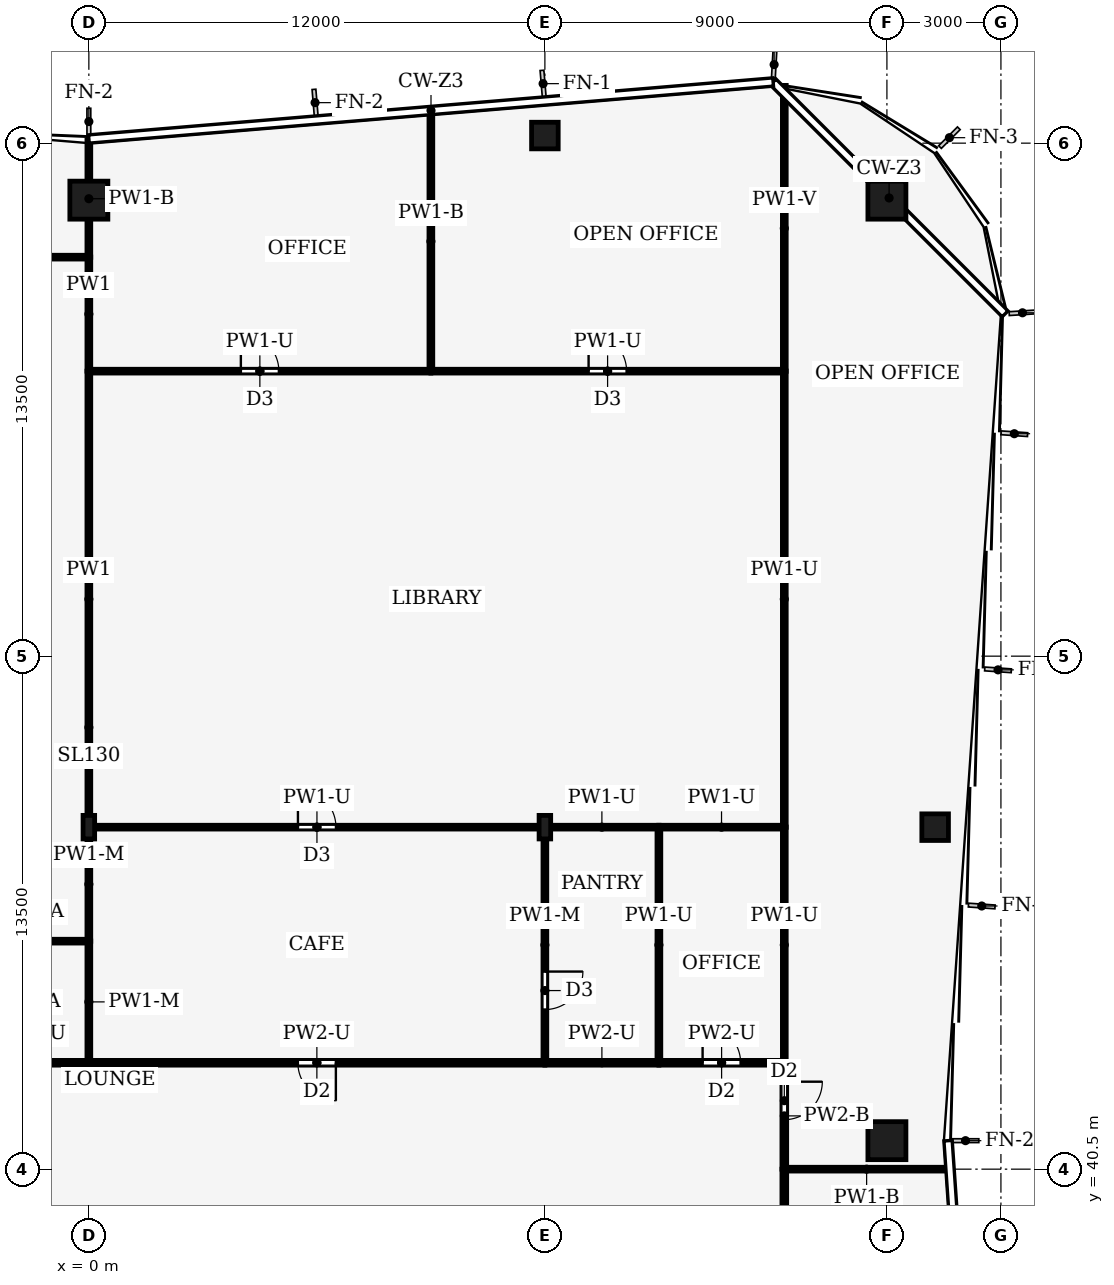
"""IFC4 building model, lengths in metres.
Left out: names, types, materials, properties, quantities, classifications, styles, units other than length and angle.
Written with IfcOpenShell. Run it as: python <this file> out.ifc"""

import sys

from ifc_helpers import new_model, si_unit, direction, frame, frame_2d, origin, origin_2d, place, context, subcontext, project, spatial, rectangle, hollow_rectangle, i_section, extrude, element, fill, save


model = new_model("IFC4")
c1 = context("Model", 3, precision=1e-05, world=origin(), true_north=direction((0.0, 1.0)))
c2 = subcontext(c1, "Body", "Model", "MODEL_VIEW")
j1 = project(units=[si_unit("LENGTHUNIT", "METRE"), si_unit("PLANEANGLEUNIT", "RADIAN")], contexts=[c1])
p1 = place(None, origin())
s1 = spatial("IfcSite", under=j1, at=p1, CompositionType="ELEMENT")
p2 = place(p1, origin())
s2 = spatial("IfcBuilding", under=s1, at=p2, CompositionType="ELEMENT")
p3 = place(p2, frame((0.0, 0.0, 177.0)))
s3 = spatial("IfcBuildingStorey", under=s2, at=p3, CompositionType="ELEMENT", Elevation=177.0)
for number, where, z_axis, x_axis in (
    (1, (0.0, 66.0, 0.0), (0.0, 0.0, 1.0), (1.0, 0.0, 0.0)),
    (2, (21.0, 66.0, 0.0), (0.0, 0.0, 1.0), (1.0, 0.0, 0.0)),
    (3, (21.0, 41.25, 0.0), (0.0, 0.0, 1.0), (1.0, 0.0, 0.0)),
):
    element("IfcColumn", number, at=place(p3, frame(where, z_axis=z_axis, x_axis=x_axis)), inside=s3, PredefinedType="COLUMN", context=c2, shape_type="SweptSolid", body=[
        extrude(hollow_rectangle(XDim=1.0, YDim=1.0, WallThickness=0.06, at=origin_2d()), origin(), (0.0, 0.0, 1.0), 5.0),
    ])
for number, where, z_axis, x_axis in (
    (4, (12.0, 67.7, 0.0), (0.0, 0.0, 1.0), (1.0, 0.0, 0.0)),
    (5, (22.269, 49.5, 0.0), (0.0, 0.0, 1.0), (1.0, 0.0, 0.0)),
):
    element("IfcColumn", number, at=place(p3, frame(where, z_axis=z_axis, x_axis=x_axis)), inside=s3, PredefinedType="COLUMN", context=c2, shape_type="SweptSolid", body=[
        extrude(hollow_rectangle(XDim=0.7, YDim=0.7, WallThickness=0.03, at=origin_2d()), origin(), (0.0, 0.0, 1.0), 5.0),
    ])
for number, where, z_axis, x_axis in (
    (6, (0.0, 49.5, 0.0), (0.0, 0.0, 1.0), (1.0, 0.0, 0.0)),
    (7, (12.0, 49.5, 0.0), (0.0, 0.0, 1.0), (1.0, 0.0, 0.0)),
):
    element("IfcColumn", number, at=place(p3, frame(where, z_axis=z_axis, x_axis=x_axis)), inside=s3, PredefinedType="COLUMN", context=c2, shape_type="SweptSolid", body=[
        extrude(i_section(OverallWidth=0.305, OverallDepth=0.62, WebThickness=0.021, FlangeThickness=0.04, FilletRadius=0.027, at=origin_2d()), origin(), (0.0, 0.0, 1.0), 5.0),
    ])
p4 = place(p3, frame((-3.0, 43.3, 0.0), z_axis=(0.0, 0.0, 1.0), x_axis=(1.0, 0.0, 0.0)))
e8 = element("IfcWall", 8, at=p4, inside=s3, PredefinedType="PARTITIONING", context=c2, shape_type="SweptSolid", body=[
    extrude(rectangle(XDim=3.0, YDim=0.125, at=frame_2d((1.5, 0.0))), origin(), (0.0, 0.0, 1.0), 4.44),
])
p5 = place(p4, frame((1.0, 0.0, 0.0)))
e9 = element("IfcOpeningElement", 9, at=p5, cuts=e8, PredefinedType="OPENING", context=c2, shape_type="SweptSolid", body=[
    extrude(rectangle(XDim=1.0, YDim=2.1, at=frame_2d((0.5, 1.05))), frame((0.0, 0.073, 0.0), z_axis=(0.0, -1.0, 0.0), x_axis=(1.0, 0.0, 0.0)), (0.0, 0.0, 1.0), 0.145),
])
p6 = place(p3, frame((12.0, 43.3, 0.0), z_axis=(0.0, 0.0, 1.0), x_axis=(-1.0, 0.0, 0.0)))
e10 = element("IfcWall", 10, at=p6, inside=s3, PredefinedType="PARTITIONING", context=c2, shape_type="SweptSolid", body=[
    extrude(rectangle(XDim=12.0, YDim=0.125, at=frame_2d((6.0, 0.0))), origin(), (0.0, 0.0, 1.0), 4.44),
])
p7 = place(p6, frame((5.5, 0.0, 0.0)))
e11 = element("IfcOpeningElement", 11, at=p7, cuts=e10, PredefinedType="OPENING", context=c2, shape_type="SweptSolid", body=[
    extrude(rectangle(XDim=1.0, YDim=2.1, at=frame_2d((0.5, 1.05))), frame((0.0, 0.073, 0.0), z_axis=(0.0, -1.0, 0.0), x_axis=(1.0, 0.0, 0.0)), (0.0, 0.0, 1.0), 0.145),
])
p8 = place(p3, frame((15.0, 43.3, 0.0), z_axis=(0.0, 0.0, 1.0), x_axis=(-1.0, 0.0, 0.0)))
e12 = element("IfcWall", 12, at=p8, inside=s3, PredefinedType="PARTITIONING", context=c2, shape_type="SweptSolid", body=[
    extrude(rectangle(XDim=3.0, YDim=0.125, at=frame_2d((1.5, 0.0))), origin(), (0.0, 0.0, 1.0), 4.44),
])
p9 = place(p3, frame((15.0, 43.3, 0.0), z_axis=(0.0, 0.0, 1.0), x_axis=(1.0, 0.0, 0.0)))
e13 = element("IfcWall", 13, at=p9, inside=s3, PredefinedType="PARTITIONING", context=c2, shape_type="SweptSolid", body=[
    extrude(rectangle(XDim=3.3, YDim=0.125, at=frame_2d((1.65, 0.0))), origin(), (0.0, 0.0, 1.0), 4.44),
])
p10 = place(p9, frame((1.15, 0.0, 0.0)))
e14 = element("IfcOpeningElement", 14, at=p10, cuts=e13, PredefinedType="OPENING", context=c2, shape_type="SweptSolid", body=[
    extrude(rectangle(XDim=1.0, YDim=2.1, at=frame_2d((0.5, 1.05))), frame((0.0, 0.073, 0.0), z_axis=(0.0, -1.0, 0.0), x_axis=(1.0, 0.0, 0.0)), (0.0, 0.0, 1.0), 0.145),
])
p11 = place(p3, frame((18.3, 40.5, 0.0), z_axis=(0.0, 0.0, 1.0), x_axis=(0.0, -1.0, 0.0)))
e15 = element("IfcWall", 15, at=p11, inside=s3, PredefinedType="PARTITIONING", context=c2, shape_type="SweptSolid", body=[
    extrude(rectangle(XDim=12.0, YDim=0.125, at=frame_2d((6.0, 0.0))), origin(), (0.0, 0.0, 1.0), 4.14),
])
p12 = place(p11, frame((5.5, 0.0, 0.0)))
e16 = element("IfcOpeningElement", 16, at=p12, cuts=e15, PredefinedType="OPENING", context=c2, shape_type="SweptSolid", body=[
    extrude(rectangle(XDim=1.0, YDim=2.1, at=frame_2d((0.5, 1.05))), frame((0.0, 0.073, 0.0), z_axis=(0.0, -1.0, 0.0), x_axis=(1.0, 0.0, 0.0)), (0.0, 0.0, 1.0), 0.145),
])
p13 = place(p3, frame((18.3, 43.304, 0.0), z_axis=(0.0, 0.0, 1.0), x_axis=(0.0, -1.0, 0.0)))
e17 = element("IfcWall", 17, at=p13, inside=s3, PredefinedType="PARTITIONING", context=c2, shape_type="SweptSolid", body=[
    extrude(rectangle(XDim=2.804, YDim=0.125, at=frame_2d((1.402, 0.0))), origin(), (0.0, 0.0, 1.0), 4.87),
])
p14 = place(p13, frame((0.502, 0.0, 0.0)))
e18 = element("IfcOpeningElement", 18, at=p14, cuts=e17, PredefinedType="OPENING", context=c2, shape_type="SweptSolid", body=[
    extrude(rectangle(XDim=1.0, YDim=2.1, at=frame_2d((0.5, 1.05))), frame((0.0, 0.073, 0.0), z_axis=(0.0, -1.0, 0.0), x_axis=(1.0, 0.0, 0.0)), (0.0, 0.0, 1.0), 0.145),
])
p15 = place(p3, frame((-3.004, 46.5, 0.0), z_axis=(0.0, 0.0, 1.0), x_axis=(1.0, 0.0, 0.0)))
e19 = element("IfcWall", 19, at=p15, inside=s3, PredefinedType="PARTITIONING", context=c2, shape_type="SweptSolid", body=[
    extrude(rectangle(XDim=3.004, YDim=0.1, at=frame_2d((1.502, 0.0))), origin(), (0.0, 0.0, 1.0), 4.87),
])
p16 = place(p15, frame((0.602, 0.0, 0.0)))
e20 = element("IfcOpeningElement", 20, at=p16, cuts=e19, PredefinedType="OPENING", context=c2, shape_type="SweptSolid", body=[
    extrude(rectangle(XDim=1.0, YDim=2.1, at=frame_2d((0.5, 1.05))), frame((0.0, 0.06, 0.0), z_axis=(0.0, -1.0, 0.0), x_axis=(1.0, 0.0, 0.0)), (0.0, 0.0, 1.0), 0.12),
])
p17 = place(p3, frame((0.0, 43.3, 0.0), z_axis=(0.0, 0.0, 1.0), x_axis=(0.0, 1.0, 0.0)))
e21 = element("IfcWall", 21, at=p17, inside=s3, PredefinedType="PARTITIONING", context=c2, shape_type="SweptSolid", body=[
    extrude(rectangle(XDim=3.204, YDim=0.1, at=frame_2d((1.602, 0.0))), origin(), (0.0, 0.0, 1.0), 4.44),
])
p18 = place(p3, frame((-9.0, 64.5, 0.0), z_axis=(0.0, 0.0, 1.0), x_axis=(1.0, 0.0, 0.0)))
e22 = element("IfcWall", 22, at=p18, inside=s3, PredefinedType="PARTITIONING", context=c2, shape_type="SweptSolid", body=[
    extrude(rectangle(XDim=9.0, YDim=0.1, at=frame_2d((4.5, 0.0))), origin(), (0.0, 0.0, 1.0), 4.24),
])
p19 = place(p18, frame((4.0, 0.0, 0.0)))
e23 = element("IfcOpeningElement", 23, at=p19, cuts=e22, PredefinedType="OPENING", context=c2, shape_type="SweptSolid", body=[
    extrude(rectangle(XDim=1.0, YDim=2.1, at=frame_2d((0.5, 1.05))), frame((0.0, 0.06, 0.0), z_axis=(0.0, -1.0, 0.0), x_axis=(1.0, 0.0, 0.0)), (0.0, 0.0, 1.0), 0.12),
])
p20 = place(p3, frame((0.0, 46.496, 0.0), z_axis=(0.0, 0.0, 1.0), x_axis=(0.0, 1.0, 0.0)))
e24 = element("IfcWall", 24, at=p20, inside=s3, PredefinedType="PARTITIONING", context=c2, shape_type="SweptSolid", body=[
    extrude(rectangle(XDim=3.004, YDim=0.1, at=frame_2d((1.502, 0.0))), origin(), (0.0, 0.0, 1.0), 4.44),
])
p21 = place(p3, frame((0.0, 49.5, 0.0), z_axis=(0.0, 0.0, 1.0), x_axis=(0.0, 1.0, 0.0)))
e25 = element("IfcWall", 25, at=p21, inside=s3, PredefinedType="PARTITIONING", context=c2, shape_type="SweptSolid", body=[
    extrude(rectangle(XDim=12.0, YDim=0.1, at=frame_2d((6.0, 0.0))), origin(), (0.0, 0.0, 1.0), 4.29),
])
p22 = place(p3, frame((0.0, 61.5, 0.0), z_axis=(0.0, 0.0, 1.0), x_axis=(0.0, 1.0, 0.0)))
e26 = element("IfcWall", 26, at=p22, inside=s3, PredefinedType="PARTITIONING", context=c2, shape_type="SweptSolid", body=[
    extrude(rectangle(XDim=3.004, YDim=0.1, at=frame_2d((1.502, 0.0))), origin(), (0.0, 0.0, 1.0), 4.29),
])
p23 = place(p3, frame((0.0, 64.496, 0.0), z_axis=(0.0, 0.0, 1.0), x_axis=(0.0, 1.0, 0.0)))
e27 = element("IfcWall", 27, at=p23, inside=s3, PredefinedType="PARTITIONING", context=c2, shape_type="SweptSolid", body=[
    extrude(rectangle(XDim=3.084, YDim=0.1, at=frame_2d((1.542, 0.0))), origin(), (0.0, 0.0, 1.0), 4.04),
])
p24 = place(p3, frame((12.0, 49.5, 0.0), z_axis=(0.0, 0.0, 1.0), x_axis=(0.0, -1.0, 0.0)))
e28 = element("IfcWall", 28, at=p24, inside=s3, PredefinedType="PARTITIONING", context=c2, shape_type="SweptSolid", body=[
    extrude(rectangle(XDim=6.2, YDim=0.1, at=frame_2d((3.1, 0.0))), origin(), (0.0, 0.0, 1.0), 4.44),
])
p25 = place(p24, frame((3.8, 0.0, 0.0)))
e29 = element("IfcOpeningElement", 29, at=p25, cuts=e28, PredefinedType="OPENING", context=c2, shape_type="SweptSolid", body=[
    extrude(rectangle(XDim=1.0, YDim=2.1, at=frame_2d((0.5, 1.05))), frame((0.0, 0.06, 0.0), z_axis=(0.0, -1.0, 0.0), x_axis=(1.0, 0.0, 0.0)), (0.0, 0.0, 1.0), 0.12),
])
p26 = place(p3, frame((0.0, 49.5, 0.0), z_axis=(0.0, 0.0, 1.0), x_axis=(1.0, 0.0, 0.0)))
e30 = element("IfcWall", 30, at=p26, inside=s3, PredefinedType="PARTITIONING", context=c2, shape_type="SweptSolid", body=[
    extrude(rectangle(XDim=12.004, YDim=0.1, at=frame_2d((6.002, 0.0))), origin(), (0.0, 0.0, 1.0), 4.24),
])
p27 = place(p26, frame((5.502, 0.0, 0.0)))
e31 = element("IfcOpeningElement", 31, at=p27, cuts=e30, PredefinedType="OPENING", context=c2, shape_type="SweptSolid", body=[
    extrude(rectangle(XDim=1.0, YDim=2.1, at=frame_2d((0.5, 1.05))), frame((0.0, 0.06, 0.0), z_axis=(0.0, -1.0, 0.0), x_axis=(1.0, 0.0, 0.0)), (0.0, 0.0, 1.0), 0.12),
])
p28 = place(p3, frame((15.0, 43.3, 0.0), z_axis=(0.0, 0.0, 1.0), x_axis=(0.0, 1.0, 0.0)))
e32 = element("IfcWall", 32, at=p28, inside=s3, PredefinedType="PARTITIONING", context=c2, shape_type="SweptSolid", body=[
    extrude(rectangle(XDim=6.2, YDim=0.1, at=frame_2d((3.1, 0.0))), origin(), (0.0, 0.0, 1.0), 4.24),
])
p29 = place(p3, frame((15.004, 49.5, 0.0), z_axis=(0.0, 0.0, 1.0), x_axis=(-1.0, 0.0, 0.0)))
e33 = element("IfcWall", 33, at=p29, inside=s3, PredefinedType="PARTITIONING", context=c2, shape_type="SweptSolid", body=[
    extrude(rectangle(XDim=3.008, YDim=0.1, at=frame_2d((1.504, 0.0))), origin(), (0.0, 0.0, 1.0), 4.24),
])
p30 = place(p3, frame((18.3, 49.5, 0.0), z_axis=(0.0, 0.0, 1.0), x_axis=(-1.0, 0.0, 0.0)))
e34 = element("IfcWall", 34, at=p30, inside=s3, PredefinedType="PARTITIONING", context=c2, shape_type="SweptSolid", body=[
    extrude(rectangle(XDim=3.304, YDim=0.1, at=frame_2d((1.652, 0.0))), origin(), (0.0, 0.0, 1.0), 4.24),
])
p31 = place(p3, frame((18.3, 43.296, 0.0), z_axis=(0.0, 0.0, 1.0), x_axis=(0.0, 1.0, 0.0)))
e35 = element("IfcWall", 35, at=p31, inside=s3, PredefinedType="PARTITIONING", context=c2, shape_type="SweptSolid", body=[
    extrude(rectangle(XDim=6.208, YDim=0.1, at=frame_2d((3.104, 0.0))), origin(), (0.0, 0.0, 1.0), 4.24),
])
p32 = place(p3, frame((0.0, 61.5, 0.0), z_axis=(0.0, 0.0, 1.0), x_axis=(1.0, 0.0, 0.0)))
e36 = element("IfcWall", 36, at=p32, inside=s3, PredefinedType="PARTITIONING", context=c2, shape_type="SweptSolid", body=[
    extrude(rectangle(XDim=9.0, YDim=0.1, at=frame_2d((4.5, 0.0))), origin(), (0.0, 0.0, 1.0), 4.24),
])
p33 = place(p32, frame((4.0, 0.0, 0.0)))
e37 = element("IfcOpeningElement", 37, at=p33, cuts=e36, PredefinedType="OPENING", context=c2, shape_type="SweptSolid", body=[
    extrude(rectangle(XDim=1.0, YDim=2.1, at=frame_2d((0.5, 1.05))), frame((0.0, 0.06, 0.0), z_axis=(0.0, -1.0, 0.0), x_axis=(1.0, 0.0, 0.0)), (0.0, 0.0, 1.0), 0.12),
])
p34 = place(p3, frame((9.0, 61.5, 0.0), z_axis=(0.0, 0.0, 1.0), x_axis=(1.0, 0.0, 0.0)))
e38 = element("IfcWall", 38, at=p34, inside=s3, PredefinedType="PARTITIONING", context=c2, shape_type="SweptSolid", body=[
    extrude(rectangle(XDim=9.3, YDim=0.1, at=frame_2d((4.65, 0.0))), origin(), (0.0, 0.0, 1.0), 4.24),
])
p35 = place(p34, frame((4.15, 0.0, 0.0)))
e39 = element("IfcOpeningElement", 39, at=p35, cuts=e38, PredefinedType="OPENING", context=c2, shape_type="SweptSolid", body=[
    extrude(rectangle(XDim=1.0, YDim=2.1, at=frame_2d((0.5, 1.05))), frame((0.0, 0.06, 0.0), z_axis=(0.0, -1.0, 0.0), x_axis=(1.0, 0.0, 0.0)), (0.0, 0.0, 1.0), 0.12),
])
p36 = place(p3, frame((18.3, 49.496, 0.0), z_axis=(0.0, 0.0, 1.0), x_axis=(0.0, 1.0, 0.0)))
e40 = element("IfcWall", 40, at=p36, inside=s3, PredefinedType="PARTITIONING", context=c2, shape_type="SweptSolid", body=[
    extrude(rectangle(XDim=12.008, YDim=0.1, at=frame_2d((6.004, 0.0))), origin(), (0.0, 0.0, 1.0), 4.24),
])
p37 = place(p3, frame((9.0, 61.5, 0.0), z_axis=(0.0, 0.0, 1.0), x_axis=(0.0, 1.0, 0.0)))
e41 = element("IfcWall", 41, at=p37, inside=s3, PredefinedType="PARTITIONING", context=c2, shape_type="SweptSolid", body=[
    extrude(rectangle(XDim=6.83, YDim=0.1, at=frame_2d((3.415, 0.0))), origin(), (0.0, 0.0, 1.0), 4.04),
])
p38 = place(p3, frame((18.3, 61.496, 0.0), z_axis=(0.0, 0.0, 1.0), x_axis=(0.0, 1.0, 0.0)))
e42 = element("IfcWall", 42, at=p38, inside=s3, PredefinedType="PARTITIONING", context=c2, shape_type="SweptSolid", body=[
    extrude(rectangle(XDim=7.524, YDim=0.1, at=frame_2d((3.762, 0.0))), origin(), (0.0, 0.0, 1.0), 3.93),
])
p39 = place(p3, frame((22.632, 40.5, 0.0), z_axis=(0.0, 0.0, 1.0), x_axis=(-1.0, 0.0, 0.0)))
e43 = element("IfcWall", 43, at=p39, inside=s3, PredefinedType="PARTITIONING", context=c2, shape_type="SweptSolid", body=[
    extrude(rectangle(XDim=4.332, YDim=0.1, at=frame_2d((2.166, 0.0))), origin(), (0.0, 0.0, 1.0), 4.04),
])
p40 = place(p7, origin())
e44 = element("IfcDoor", 44, at=p40, inside=s3, OperationType="SINGLE_SWING_LEFT", PredefinedType="DOOR", context=c2, shape_type="SweptSolid", body=[
    extrude(rectangle(XDim=1.0, YDim=2.1, at=frame_2d((0.5, 1.05))), frame((0.0, 0.025, 0.0), z_axis=(0.0, -1.0, 0.0), x_axis=(1.0, 0.0, 0.0)), (0.0, 0.0, 1.0), 0.05),
])
fill(e11, e44)
p41 = place(p10, origin())
e45 = element("IfcDoor", 45, at=p41, inside=s3, OperationType="SINGLE_SWING_RIGHT", PredefinedType="DOOR", context=c2, shape_type="SweptSolid", body=[
    extrude(rectangle(XDim=1.0, YDim=2.1, at=frame_2d((0.5, 1.05))), frame((0.0, 0.025, 0.0), z_axis=(0.0, -1.0, 0.0), x_axis=(1.0, 0.0, 0.0)), (0.0, 0.0, 1.0), 0.05),
])
fill(e14, e45)
p42 = place(p14, origin())
e46 = element("IfcDoor", 46, at=p42, inside=s3, OperationType="SINGLE_SWING_LEFT", PredefinedType="DOOR", context=c2, shape_type="SweptSolid", body=[
    extrude(rectangle(XDim=1.0, YDim=2.1, at=frame_2d((0.5, 1.05))), frame((0.0, 0.025, 0.0), z_axis=(0.0, -1.0, 0.0), x_axis=(1.0, 0.0, 0.0)), (0.0, 0.0, 1.0), 0.05),
])
fill(e18, e46)
p43 = place(p25, origin())
e47 = element("IfcDoor", 47, at=p43, inside=s3, OperationType="SINGLE_SWING_RIGHT", PredefinedType="DOOR", context=c2, shape_type="SweptSolid", body=[
    extrude(rectangle(XDim=1.0, YDim=2.1, at=frame_2d((0.5, 1.05))), frame((0.0, 0.025, 0.0), z_axis=(0.0, -1.0, 0.0), x_axis=(1.0, 0.0, 0.0)), (0.0, 0.0, 1.0), 0.05),
])
fill(e29, e47)
p44 = place(p27, origin())
e48 = element("IfcDoor", 48, at=p44, inside=s3, OperationType="SINGLE_SWING_RIGHT", PredefinedType="DOOR", context=c2, shape_type="SweptSolid", body=[
    extrude(rectangle(XDim=1.0, YDim=2.1, at=frame_2d((0.5, 1.05))), frame((0.0, 0.025, 0.0), z_axis=(0.0, -1.0, 0.0), x_axis=(1.0, 0.0, 0.0)), (0.0, 0.0, 1.0), 0.05),
])
fill(e31, e48)
p45 = place(p33, origin())
e49 = element("IfcDoor", 49, at=p45, inside=s3, OperationType="SINGLE_SWING_LEFT", PredefinedType="DOOR", context=c2, shape_type="SweptSolid", body=[
    extrude(rectangle(XDim=1.0, YDim=2.1, at=frame_2d((0.5, 1.05))), frame((0.0, 0.025, 0.0), z_axis=(0.0, -1.0, 0.0), x_axis=(1.0, 0.0, 0.0)), (0.0, 0.0, 1.0), 0.05),
])
fill(e37, e49)
p46 = place(p35, origin())
e50 = element("IfcDoor", 50, at=p46, inside=s3, OperationType="SINGLE_SWING_RIGHT", PredefinedType="DOOR", context=c2, shape_type="SweptSolid", body=[
    extrude(rectangle(XDim=1.0, YDim=2.1, at=frame_2d((0.5, 1.05))), frame((0.0, 0.025, 0.0), z_axis=(0.0, -1.0, 0.0), x_axis=(1.0, 0.0, 0.0)), (0.0, 0.0, 1.0), 0.05),
])
fill(e39, e50)
save(model, sys.argv[1])
